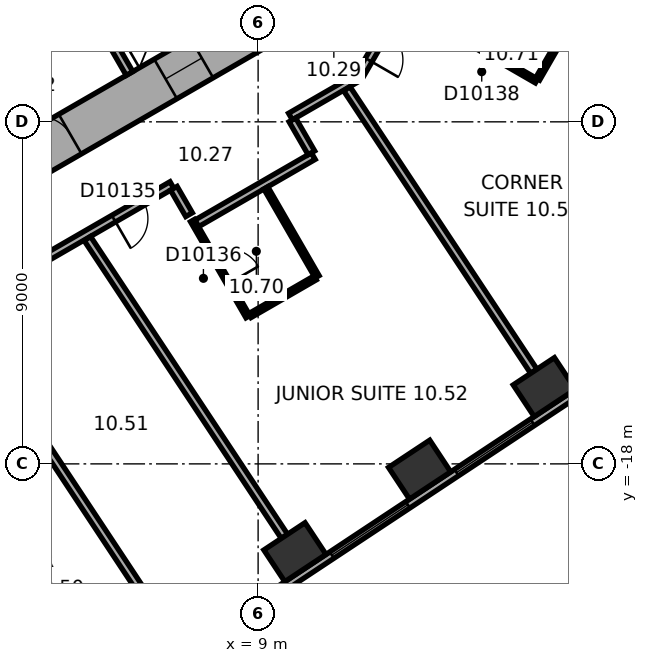
"""IFC4 building model, lengths in metres.
Left out: names, types, materials, properties, quantities, classifications, styles, units other than length and angle.
Written with IfcOpenShell. Run it as: python <this file> out.ifc"""

import sys

from ifc_helpers import new_model, si_unit, direction, frame, frame_2d, origin, origin_2d, place, context, subcontext, project, spatial, rectangle, extrude, element, fill, save


model = new_model("IFC4")
c1 = context("Model", 3, precision=1e-05, world=origin(), true_north=direction((0.0, 1.0)))
c2 = subcontext(c1, "Body", "Model", "MODEL_VIEW")
j1 = project(units=[si_unit("LENGTHUNIT", "METRE"), si_unit("PLANEANGLEUNIT", "RADIAN")], contexts=[c1])
p1 = place(None, origin())
s1 = spatial("IfcSite", under=j1, at=p1, CompositionType="ELEMENT")
p2 = place(p1, origin())
s2 = spatial("IfcBuilding", under=s1, at=p2, CompositionType="ELEMENT")
p3 = place(p2, frame((0.0, 0.0, 53.9)))
s3 = spatial("IfcBuildingStorey", under=s2, at=p3, CompositionType="ELEMENT", Elevation=53.9)
for number, where, z_axis, x_axis in (
    (1, (9.969, -20.324, 0.0), (0.0, 0.0, 1.0), (0.834, 0.552, 0.0)),
    (2, (13.25, -18.152, 0.0), (0.0, 0.0, 1.0), (0.834, 0.552, 0.0)),
    (3, (16.531, -15.981, 0.0), (0.0, 0.0, 1.0), (0.834, 0.552, 0.0)),
):
    element("IfcColumn", number, at=place(p3, frame(where, z_axis=z_axis, x_axis=x_axis)), inside=s3, PredefinedType="COLUMN", context=c2, shape_type="SweptSolid", body=[
        extrude(rectangle(XDim=1.3, YDim=1.0, at=origin_2d()), origin(), (0.0, 0.0, 1.0), 3.3),
    ])
p4 = place(p3, frame((-0.3, -11.836, 0.0), z_axis=(0.0, 0.0, 1.0), x_axis=(0.866021384402, 0.500006961711, 0.0)))
e4 = element("IfcWall", 4, at=p4, inside=s3, PredefinedType="SHEAR", context=c2, shape_type="SweptSolid", body=[
    extrude(rectangle(XDim=12.355, YDim=1.2, at=frame_2d((6.178, 0.0))), origin(), (0.0, 0.0, 1.0), 3.3),
])
p5 = place(p4, frame((4.128, 0.0, 0.0)))
e5 = element("IfcOpeningElement", 5, at=p5, cuts=e4, PredefinedType="OPENING", context=c2, shape_type="SweptSolid", body=[
    extrude(rectangle(XDim=0.9, YDim=2.1, at=frame_2d((0.45, 1.05))), frame((0.0, 0.61, 0.0), z_axis=(0.0, -1.0, 0.0), x_axis=(1.0, 0.0, 0.0)), (0.0, 0.0, 1.0), 1.22),
])
p6 = place(p4, frame((7.928, 0.0, 0.0)))
e6 = element("IfcOpeningElement", 6, at=p6, cuts=e4, PredefinedType="OPENING", context=c2, shape_type="SweptSolid", body=[
    extrude(rectangle(XDim=1.1, YDim=2.1, at=frame_2d((0.55, 1.05))), frame((0.0, 0.61, 0.0), z_axis=(0.0, -1.0, 0.0), x_axis=(1.0, 0.0, 0.0)), (0.0, 0.0, 1.0), 1.22),
])
p7 = place(p3, frame((3.083, -25.601, 0.0), z_axis=(0.0, 0.0, 1.0), x_axis=(0.833884295743, 0.551939291329, 0.0)))
e7 = element("IfcWall", 7, at=p7, inside=s3, PredefinedType="STANDARD", context=c2, shape_type="SweptSolid", body=[
    extrude(rectangle(XDim=21.246, YDim=0.2, at=frame_2d((10.623, 0.0))), origin(), (0.0, 0.0, 1.0), 3.3),
])
p8 = place(p7, frame((1.553, 0.0, 0.8)))
e8 = element("IfcOpeningElement", 8, at=p8, cuts=e7, PredefinedType="OPENING", context=c2, shape_type="SweptSolid", body=[
    extrude(rectangle(XDim=2.4, YDim=1.7, at=frame_2d((1.2, 0.85))), frame((0.0, 0.11, 0.0), z_axis=(0.0, -1.0, 0.0), x_axis=(1.0, 0.0, 0.0)), (0.0, 0.0, 1.0), 0.22),
])
p9 = place(p7, frame((5.488, 0.0, 0.8)))
e9 = element("IfcOpeningElement", 9, at=p9, cuts=e7, PredefinedType="OPENING", context=c2, shape_type="SweptSolid", body=[
    extrude(rectangle(XDim=2.4, YDim=1.7, at=frame_2d((1.2, 0.85))), frame((0.0, 0.11, 0.0), z_axis=(0.0, -1.0, 0.0), x_axis=(1.0, 0.0, 0.0)), (0.0, 0.0, 1.0), 0.22),
])
p10 = place(p7, frame((9.422, 0.0, 0.8)))
e10 = element("IfcOpeningElement", 10, at=p10, cuts=e7, PredefinedType="OPENING", context=c2, shape_type="SweptSolid", body=[
    extrude(rectangle(XDim=2.4, YDim=1.7, at=frame_2d((1.2, 0.85))), frame((0.0, 0.11, 0.0), z_axis=(0.0, -1.0, 0.0), x_axis=(1.0, 0.0, 0.0)), (0.0, 0.0, 1.0), 0.22),
])
p11 = place(p7, frame((13.357, 0.0, 0.8)))
e11 = element("IfcOpeningElement", 11, at=p11, cuts=e7, PredefinedType="OPENING", context=c2, shape_type="SweptSolid", body=[
    extrude(rectangle(XDim=2.4, YDim=1.7, at=frame_2d((1.2, 0.85))), frame((0.0, 0.11, 0.0), z_axis=(0.0, -1.0, 0.0), x_axis=(1.0, 0.0, 0.0)), (0.0, 0.0, 1.0), 0.22),
])
p12 = place(p7, frame((17.291, 0.0, 0.8)))
e12 = element("IfcOpeningElement", 12, at=p12, cuts=e7, PredefinedType="OPENING", context=c2, shape_type="SweptSolid", body=[
    extrude(rectangle(XDim=2.4, YDim=1.7, at=frame_2d((1.2, 0.85))), frame((0.0, 0.11, 0.0), z_axis=(0.0, -1.0, 0.0), x_axis=(1.0, 0.0, 0.0)), (0.0, 0.0, 1.0), 0.22),
])
p13 = place(p3, frame((-0.024, -8.559, 0.0), z_axis=(0.0, 0.0, 1.0), x_axis=(0.866026010844, 0.49999894854, 0.0)))
e13 = element("IfcWall", 13, at=p13, inside=s3, PredefinedType="PARTITIONING", context=c2, shape_type="SweptSolid", body=[
    extrude(rectangle(XDim=8.0, YDim=0.2, at=frame_2d((4.0, 0.0))), origin(), (0.0, 0.0, 1.0), 3.05),
])
p14 = place(p3, frame((4.516, -5.822, 0.0), z_axis=(0.0, 0.0, 1.0), x_axis=(0.499946605688, -0.86605622881, 0.0)))
e14 = element("IfcWall", 14, at=p14, inside=s3, PredefinedType="PARTITIONING", context=c2, shape_type="SweptSolid", body=[
    extrude(rectangle(XDim=2.2, YDim=0.2, at=frame_2d((1.1, 0.0))), origin(), (0.0, 0.0, 1.0), 3.05),
])
p15 = place(p3, frame((0.847, -7.767, 0.0), z_axis=(0.0, 0.0, 1.0), x_axis=(0.866027801685, 0.499995846692, 0.0)))
e15 = element("IfcWall", 15, at=p15, inside=s3, PredefinedType="SHEAR", context=c2, shape_type="SweptSolid", body=[
    extrude(rectangle(XDim=7.06, YDim=0.3, at=frame_2d((3.53, 0.0))), origin(), (0.0, 0.0, 1.0), 3.05),
])
p16 = place(p3, frame((1.033, -13.953, 0.0), z_axis=(0.0, 0.0, 1.0), x_axis=(0.866017531406, 0.500013635111, 0.0)))
e16 = element("IfcWall", 16, at=p16, inside=s3, PredefinedType="PARTITIONING", context=c2, shape_type="SweptSolid", body=[
    extrude(rectangle(XDim=6.58, YDim=0.2, at=frame_2d((3.29, 0.0))), origin(), (0.0, 0.0, 1.0), 3.05),
])
p17 = place(p16, frame((1.521, 0.0, 0.0)))
e17 = element("IfcOpeningElement", 17, at=p17, cuts=e16, PredefinedType="OPENING", context=c2, shape_type="SweptSolid", body=[
    extrude(rectangle(XDim=0.9, YDim=2.1, at=frame_2d((0.45, 1.05))), frame((0.0, 0.11, 0.0), z_axis=(0.0, -1.0, 0.0), x_axis=(1.0, 0.0, 0.0)), (0.0, 0.0, 1.0), 0.22),
])
p18 = place(p16, frame((4.811, 0.0, 0.0)))
e18 = element("IfcOpeningElement", 18, at=p18, cuts=e16, PredefinedType="OPENING", context=c2, shape_type="SweptSolid", body=[
    extrude(rectangle(XDim=0.9, YDim=2.1, at=frame_2d((0.45, 1.05))), frame((0.0, 0.11, 0.0), z_axis=(0.0, -1.0, 0.0), x_axis=(1.0, 0.0, 0.0)), (0.0, 0.0, 1.0), 0.22),
])
p19 = place(p3, frame((6.412, -22.079, 0.0), z_axis=(0.0, 0.0, 1.0), x_axis=(-0.551919507115, 0.83389739037, 0.0)))
e19 = element("IfcWall", 19, at=p19, inside=s3, PredefinedType="PARTITIONING", context=c2, shape_type="SweptSolid", body=[
    extrude(rectangle(XDim=9.635, YDim=0.2, at=frame_2d((4.817, 0.0))), origin(), (0.0, 0.0, 1.0), 3.05),
])
p20 = place(p3, frame((6.782, -10.749, 0.0), z_axis=(0.0, 0.0, 1.0), x_axis=(0.500170954823, -0.865926680471, 0.0)))
e20 = element("IfcWall", 20, at=p20, inside=s3, PredefinedType="PARTITIONING", context=c2, shape_type="SweptSolid", body=[
    extrude(rectangle(XDim=0.801, YDim=0.2, at=frame_2d((0.4, 0.0))), origin(), (0.0, 0.0, 1.0), 3.05),
])
p21 = place(p3, frame((7.385, -11.673, 0.0), z_axis=(0.0, 0.0, 1.0), x_axis=(0.866037524642, 0.499979005472, 0.0)))
e21 = element("IfcWall", 21, at=p21, inside=s3, PredefinedType="PARTITIONING", context=c2, shape_type="SweptSolid", body=[
    extrude(rectangle(XDim=3.542, YDim=0.2, at=frame_2d((1.771, 0.0))), origin(), (0.0, 0.0, 1.0), 3.05),
])
p22 = place(p3, frame((8.733, -14.127, 0.0), z_axis=(0.0, 0.0, 1.0), x_axis=(-0.499978132246, 0.86603802877, 0.0)))
e22 = element("IfcWall", 22, at=p22, inside=s3, PredefinedType="PARTITIONING", context=c2, shape_type="SweptSolid", body=[
    extrude(rectangle(XDim=2.921, YDim=0.12, at=frame_2d((1.46, 0.0))), origin(), (0.0, 0.0, 1.0), 3.05),
])
p23 = place(p22, frame((1.01, 0.0, 0.0)))
e23 = element("IfcOpeningElement", 23, at=p23, cuts=e22, PredefinedType="OPENING", context=c2, shape_type="SweptSolid", body=[
    extrude(rectangle(XDim=0.9, YDim=2.1, at=frame_2d((0.45, 1.05))), frame((0.0, 0.07, 0.0), z_axis=(0.0, -1.0, 0.0), x_axis=(1.0, 0.0, 0.0)), (0.0, 0.0, 1.0), 0.14),
])
p24 = place(p3, frame((9.203, -10.738, 0.0), z_axis=(0.0, 0.0, 1.0), x_axis=(0.50000943426, -0.866019956843, 0.0)))
e24 = element("IfcWall", 24, at=p24, inside=s3, PredefinedType="PARTITIONING", context=c2, shape_type="SweptSolid", body=[
    extrude(rectangle(XDim=2.7, YDim=0.12, at=frame_2d((1.35, 0.0))), origin(), (0.0, 0.0, 1.0), 3.05),
])
p25 = place(p3, frame((9.693, -19.907, 0.0), z_axis=(0.0, 0.0, 1.0), x_axis=(-0.551938394837, 0.833884889121, 0.0)))
e25 = element("IfcWall", 25, at=p25, inside=s3, PredefinedType="PARTITIONING", context=c2, shape_type="SweptSolid", body=[
    extrude(rectangle(XDim=9.394, YDim=0.2, at=frame_2d((4.697, 0.0))), origin(), (0.0, 0.0, 1.0), 2.6),
])
p26 = place(p3, frame((9.852, -8.861, 0.0), z_axis=(0.0, 0.0, 1.0), x_axis=(0.866013291437, 0.500020978615, 0.0)))
e26 = element("IfcWall", 26, at=p26, inside=s3, PredefinedType="PARTITIONING", context=c2, shape_type="SweptSolid", body=[
    extrude(rectangle(XDim=2.077, YDim=0.2, at=frame_2d((1.038, 0.0))), origin(), (0.0, 0.0, 1.0), 3.05),
])
p27 = place(p3, frame((10.402, -9.815, 0.0), z_axis=(0.0, 0.0, 1.0), x_axis=(-0.499968756647, 0.866043441391, 0.0)))
e27 = element("IfcWall", 27, at=p27, inside=s3, PredefinedType="PARTITIONING", context=c2, shape_type="SweptSolid", body=[
    extrude(rectangle(XDim=1.001, YDim=0.2, at=frame_2d((0.5, 0.0))), origin(), (0.0, 0.0, 1.0), 3.05),
])
p28 = place(p3, frame((10.501, -13.106, 0.0), z_axis=(0.0, 0.0, 1.0), x_axis=(-0.866013262469, -0.500021028785, 0.0)))
e28 = element("IfcWall", 28, at=p28, inside=s3, PredefinedType="PARTITIONING", context=c2, shape_type="SweptSolid", body=[
    extrude(rectangle(XDim=1.982, YDim=0.12, at=frame_2d((0.991, 0.0))), origin(), (0.0, 0.0, 1.0), 3.05),
])
p29 = place(p3, frame((11.67, -7.788, 0.0), z_axis=(0.0, 0.0, 1.0), x_axis=(0.500063286585, 0.865988862174, 0.0)))
e29 = element("IfcWall", 29, at=p29, inside=s3, PredefinedType="PARTITIONING", context=c2, shape_type="SweptSolid", body=[
    extrude(rectangle(XDim=1.86, YDim=0.2, at=frame_2d((0.93, 0.0))), origin(), (0.0, 0.0, 1.0), 3.05),
])
p30 = place(p29, frame((0.48, 0.0, 0.0)))
e30 = element("IfcOpeningElement", 30, at=p30, cuts=e29, PredefinedType="OPENING", context=c2, shape_type="SweptSolid", body=[
    extrude(rectangle(XDim=0.9, YDim=2.1, at=frame_2d((0.45, 1.05))), frame((0.0, 0.11, 0.0), z_axis=(0.0, -1.0, 0.0), x_axis=(1.0, 0.0, 0.0)), (0.0, 0.0, 1.0), 0.22),
])
p31 = place(p3, frame((16.255, -15.564, 0.0), z_axis=(0.0, 0.0, 1.0), x_axis=(-0.55192208744, 0.833895682562, 0.0)))
e31 = element("IfcWall", 31, at=p31, inside=s3, PredefinedType="PARTITIONING", context=c2, shape_type="SweptSolid", body=[
    extrude(rectangle(XDim=8.913, YDim=0.2, at=frame_2d((4.457, 0.0))), origin(), (0.0, 0.0, 1.0), 2.6),
])
p32 = place(p3, frame((16.326, -7.925, 0.0), z_axis=(0.0, 0.0, 1.0), x_axis=(-0.865997131366, 0.500048966069, 0.0)))
e32 = element("IfcWall", 32, at=p32, inside=s3, PredefinedType="PARTITIONING", context=c2, shape_type="SweptSolid", body=[
    extrude(rectangle(XDim=2.74, YDim=0.12, at=frame_2d((1.37, 0.0))), origin(), (0.0, 0.0, 1.0), 3.05),
])
p33 = place(p32, frame((0.92, 0.0, 0.0)))
e33 = element("IfcOpeningElement", 33, at=p33, cuts=e32, PredefinedType="OPENING", context=c2, shape_type="SweptSolid", body=[
    extrude(rectangle(XDim=0.9, YDim=2.1, at=frame_2d((0.45, 1.05))), frame((0.0, 0.07, 0.0), z_axis=(0.0, -1.0, 0.0), x_axis=(1.0, 0.0, 0.0)), (0.0, 0.0, 1.0), 0.14),
])
p34 = place(p3, frame((17.396, -6.071, 0.0), z_axis=(0.0, 0.0, 1.0), x_axis=(-0.500027264788, -0.866009661879, 0.0)))
e34 = element("IfcWall", 34, at=p34, inside=s3, PredefinedType="PARTITIONING", context=c2, shape_type="SweptSolid", body=[
    extrude(rectangle(XDim=2.08, YDim=0.12, at=frame_2d((1.04, 0.0))), origin(), (0.0, 0.0, 1.0), 3.05),
])
p35 = place(p10, origin())
e35 = element("IfcWindow", 35, at=p35, inside=s3, PartitioningType="SINGLE_PANEL", PredefinedType="WINDOW", context=c2, shape_type="SweptSolid", body=[
    extrude(rectangle(XDim=2.4, YDim=1.7, at=frame_2d((1.2, 0.85))), frame((0.0, 0.03, 0.0), z_axis=(0.0, -1.0, 0.0), x_axis=(1.0, 0.0, 0.0)), (0.0, 0.0, 1.0), 0.06),
])
fill(e10, e35)
p36 = place(p11, origin())
e36 = element("IfcWindow", 36, at=p36, inside=s3, PartitioningType="SINGLE_PANEL", PredefinedType="WINDOW", context=c2, shape_type="SweptSolid", body=[
    extrude(rectangle(XDim=2.4, YDim=1.7, at=frame_2d((1.2, 0.85))), frame((0.0, 0.03, 0.0), z_axis=(0.0, -1.0, 0.0), x_axis=(1.0, 0.0, 0.0)), (0.0, 0.0, 1.0), 0.06),
])
fill(e11, e36)
p37 = place(p5, origin())
e37 = element("IfcDoor", 37, at=p37, inside=s3, OperationType="SINGLE_SWING_LEFT", PredefinedType="DOOR", context=c2, shape_type="SweptSolid", body=[
    extrude(rectangle(XDim=0.9, YDim=2.1, at=frame_2d((0.45, 1.05))), frame((0.0, 0.025, 0.0), z_axis=(0.0, -1.0, 0.0), x_axis=(1.0, 0.0, 0.0)), (0.0, 0.0, 1.0), 0.05),
])
fill(e5, e37)
p38 = place(p6, origin())
e38 = element("IfcDoor", 38, at=p38, inside=s3, OperationType="DOUBLE_DOOR_SLIDING", PredefinedType="DOOR", context=c2, shape_type="SweptSolid", body=[
    extrude(rectangle(XDim=1.1, YDim=2.1, at=frame_2d((0.55, 1.05))), frame((0.0, 0.025, 0.0), z_axis=(0.0, -1.0, 0.0), x_axis=(1.0, 0.0, 0.0)), (0.0, 0.0, 1.0), 0.05),
])
fill(e6, e38)
p39 = place(p18, origin())
e39 = element("IfcDoor", 39, at=p39, inside=s3, OperationType="SINGLE_SWING_LEFT", PredefinedType="DOOR", context=c2, shape_type="SweptSolid", body=[
    extrude(rectangle(XDim=0.9, YDim=2.1, at=frame_2d((0.45, 1.05))), frame((0.0, 0.025, 0.0), z_axis=(0.0, -1.0, 0.0), x_axis=(1.0, 0.0, 0.0)), (0.0, 0.0, 1.0), 0.05),
])
fill(e18, e39)
p40 = place(p23, origin())
e40 = element("IfcDoor", 40, at=p40, inside=s3, OperationType="SINGLE_SWING_LEFT", PredefinedType="DOOR", context=c2, shape_type="SweptSolid", body=[
    extrude(rectangle(XDim=0.9, YDim=2.1, at=frame_2d((0.45, 1.05))), frame((0.0, 0.025, 0.0), z_axis=(0.0, -1.0, 0.0), x_axis=(1.0, 0.0, 0.0)), (0.0, 0.0, 1.0), 0.05),
])
fill(e23, e40)
p41 = place(p30, origin())
e41 = element("IfcDoor", 41, at=p41, inside=s3, OperationType="SINGLE_SWING_LEFT", PredefinedType="DOOR", context=c2, shape_type="SweptSolid", body=[
    extrude(rectangle(XDim=0.9, YDim=2.1, at=frame_2d((0.45, 1.05))), frame((0.0, 0.025, 0.0), z_axis=(0.0, -1.0, 0.0), x_axis=(1.0, 0.0, 0.0)), (0.0, 0.0, 1.0), 0.05),
])
fill(e30, e41)
p42 = place(p33, origin())
e42 = element("IfcDoor", 42, at=p42, inside=s3, OperationType="SINGLE_SWING_LEFT", PredefinedType="DOOR", context=c2, shape_type="SweptSolid", body=[
    extrude(rectangle(XDim=0.9, YDim=2.1, at=frame_2d((0.45, 1.05))), frame((0.0, 0.025, 0.0), z_axis=(0.0, -1.0, 0.0), x_axis=(1.0, 0.0, 0.0)), (0.0, 0.0, 1.0), 0.05),
])
fill(e33, e42)
save(model, sys.argv[1])
